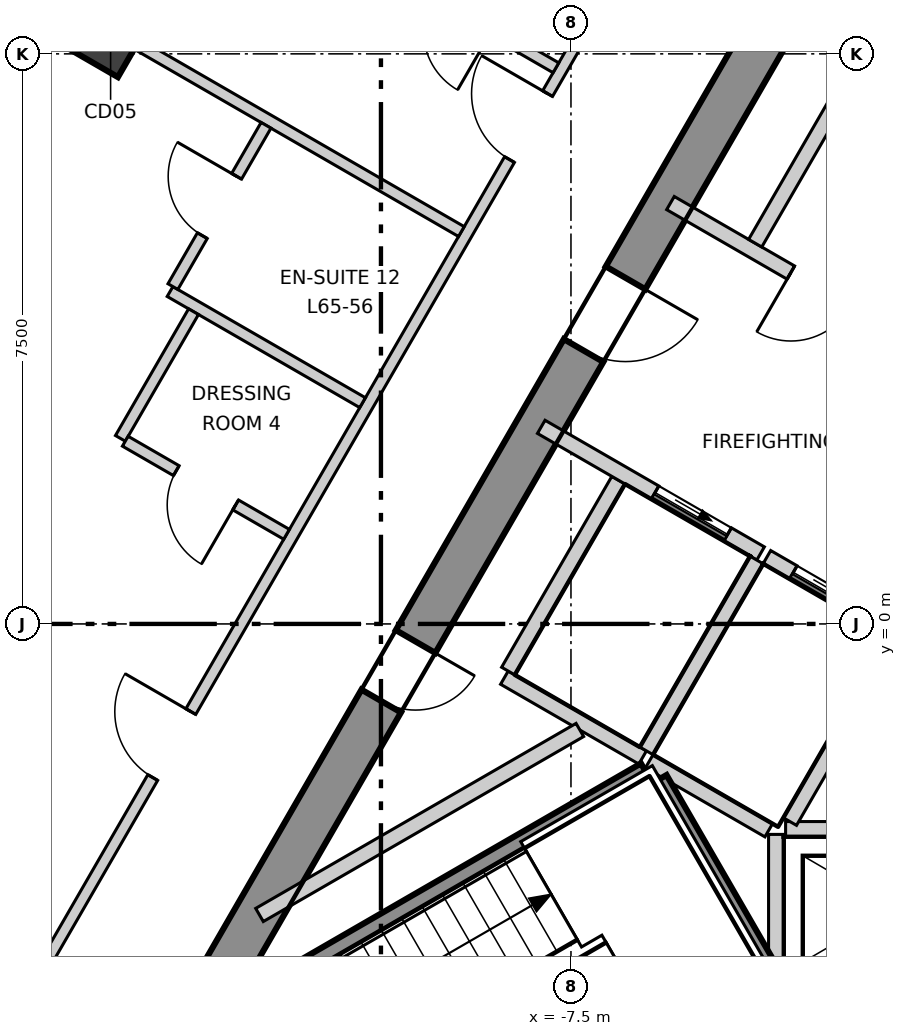
"""IFC4 building model, lengths in metres.
Left out: names, types, materials, properties, quantities, classifications, styles, units other than length and angle.
Written with IfcOpenShell. Run it as: python <this file> out.ifc"""

import sys

from ifc_helpers import new_model, si_unit, direction, frame, frame_2d, origin, origin_2d, place, context, subcontext, project, spatial, polyline, rectangle, outline, extrude, element, fill, save


model = new_model("IFC4")
c1 = context("Model", 3, precision=1e-05, world=origin(), true_north=direction((0.0, 1.0)))
c2 = subcontext(c1, "Body", "Model", "MODEL_VIEW")
j1 = project(units=[si_unit("LENGTHUNIT", "METRE"), si_unit("PLANEANGLEUNIT", "RADIAN")], contexts=[c1])
p1 = place(None, origin())
s1 = spatial("IfcSite", under=j1, at=p1, CompositionType="ELEMENT")
p2 = place(p1, origin())
s2 = spatial("IfcBuilding", under=s1, at=p2, CompositionType="ELEMENT")
p3 = place(p2, frame((0.0, 0.0, 279.1)))
s3 = spatial("IfcBuildingStorey", under=s2, at=p3, CompositionType="ELEMENT", Elevation=279.1)
p4 = place(p3, frame((-1.732, 13.3, -0.3), z_axis=(0.0, 0.0, 1.0), x_axis=(-0.500000539815, -0.866025092122, 0.0)))
e1 = element("IfcWall", 1, at=p4, inside=s3, PredefinedType="SHEAR", context=c2, shape_type="SweptSolid", body=[
    extrude(outline(polyline([(-0.173, -0.3), (1.795, -0.3), (3.763, -0.3), (5.732, -0.3), (7.7, -0.3), (9.668, -0.301), (11.637, -0.301), (13.605, -0.301), (15.573, -0.301), (17.542, -0.301), (19.51, -0.301), (21.478, -0.301), (21.131, 0.3), (19.226, 0.3), (17.321, 0.3), (15.415, 0.3), (13.51, 0.3), (11.605, 0.3), (9.699, 0.3), (7.794, 0.3), (5.889, 0.3), (3.984, 0.3), (2.078, 0.3), (0.173, 0.3), (-0.173, -0.3)])), origin(), (0.0, 0.0, 1.0), 3.6),
])
p5 = place(p4, frame((10.102, 0.0, 0.3)))
e2 = element("IfcOpeningElement", 2, at=p5, cuts=e1, PredefinedType="OPENING", context=c2, shape_type="SweptSolid", body=[
    extrude(rectangle(XDim=1.1, YDim=2.1, at=frame_2d((0.55, 1.05))), frame((0.0, 0.31, 0.0), z_axis=(0.0, -1.0, 0.0), x_axis=(1.0, 0.0, 0.0)), (0.0, 0.0, 1.0), 0.621),
])
p6 = place(p4, frame((15.627, 0.0, 0.3)))
e3 = element("IfcOpeningElement", 3, at=p6, cuts=e1, PredefinedType="OPENING", context=c2, shape_type="SweptSolid", body=[
    extrude(rectangle(XDim=0.9, YDim=2.1, at=frame_2d((0.45, 1.05))), frame((0.0, 0.31, 0.0), z_axis=(0.0, -1.0, 0.0), x_axis=(1.0, 0.0, 0.0)), (0.0, 0.0, 1.0), 0.621),
])
p7 = place(p3, frame((-13.557, 7.827, -0.3), z_axis=(0.0, 0.0, 1.0), x_axis=(0.5, 0.866025403784, 0.0)))
e4 = element("IfcColumn", 4, at=p7, inside=s3, PredefinedType="COLUMN", context=c2, shape_type="SweptSolid", body=[
    extrude(rectangle(XDim=1.0, YDim=0.8, at=origin_2d()), origin(), (0.0, 0.0, 1.0), 3.6),
])
p8 = place(p3, frame((-2.536, 28.316, 0.0), z_axis=(0.0, 0.0, 1.0), x_axis=(-0.500006870765, -0.86602143691, 0.0)))
e5 = element("IfcWall", 5, at=p8, inside=s3, PredefinedType="ELEMENTEDWALL", context=c2, shape_type="SweptSolid", body=[
    extrude(rectangle(XDim=46.49, YDim=0.2, at=frame_2d((23.245, 0.0))), origin(), (0.0, 0.0, 1.0), 3.3),
])
p9 = place(p8, frame((2.196, 0.0, 0.9)))
e6 = element("IfcOpeningElement", 6, at=p9, cuts=e5, PredefinedType="OPENING", context=c2, shape_type="SweptSolid", body=[
    extrude(rectangle(XDim=3.7, YDim=2.2, at=frame_2d((1.85, 1.1))), frame((0.0, 0.11, 0.0), z_axis=(0.0, -1.0, 0.0), x_axis=(1.0, 0.0, 0.0)), (0.0, 0.0, 1.0), 0.22),
])
p10 = place(p8, frame((7.684, 0.0, 0.9)))
e7 = element("IfcOpeningElement", 7, at=p10, cuts=e5, PredefinedType="OPENING", context=c2, shape_type="SweptSolid", body=[
    extrude(rectangle(XDim=3.7, YDim=2.2, at=frame_2d((1.85, 1.1))), frame((0.0, 0.11, 0.0), z_axis=(0.0, -1.0, 0.0), x_axis=(1.0, 0.0, 0.0)), (0.0, 0.0, 1.0), 0.22),
])
p11 = place(p8, frame((13.172, 0.0, 0.9)))
e8 = element("IfcOpeningElement", 8, at=p11, cuts=e5, PredefinedType="OPENING", context=c2, shape_type="SweptSolid", body=[
    extrude(rectangle(XDim=3.7, YDim=2.2, at=frame_2d((1.85, 1.1))), frame((0.0, 0.11, 0.0), z_axis=(0.0, -1.0, 0.0), x_axis=(1.0, 0.0, 0.0)), (0.0, 0.0, 1.0), 0.22),
])
p12 = place(p8, frame((18.66, 0.0, 0.9)))
e9 = element("IfcOpeningElement", 9, at=p12, cuts=e5, PredefinedType="OPENING", context=c2, shape_type="SweptSolid", body=[
    extrude(rectangle(XDim=3.7, YDim=2.2, at=frame_2d((1.85, 1.1))), frame((0.0, 0.11, 0.0), z_axis=(0.0, -1.0, 0.0), x_axis=(1.0, 0.0, 0.0)), (0.0, 0.0, 1.0), 0.22),
])
p13 = place(p8, frame((24.148, 0.0, 0.9)))
e10 = element("IfcOpeningElement", 10, at=p13, cuts=e5, PredefinedType="OPENING", context=c2, shape_type="SweptSolid", body=[
    extrude(rectangle(XDim=3.7, YDim=2.2, at=frame_2d((1.85, 1.1))), frame((0.0, 0.11, 0.0), z_axis=(0.0, -1.0, 0.0), x_axis=(1.0, 0.0, 0.0)), (0.0, 0.0, 1.0), 0.22),
])
p14 = place(p8, frame((29.636, 0.0, 0.9)))
e11 = element("IfcOpeningElement", 11, at=p14, cuts=e5, PredefinedType="OPENING", context=c2, shape_type="SweptSolid", body=[
    extrude(rectangle(XDim=3.7, YDim=2.2, at=frame_2d((1.85, 1.1))), frame((0.0, 0.11, 0.0), z_axis=(0.0, -1.0, 0.0), x_axis=(1.0, 0.0, 0.0)), (0.0, 0.0, 1.0), 0.22),
])
p15 = place(p8, frame((35.124, 0.0, 0.9)))
e12 = element("IfcOpeningElement", 12, at=p15, cuts=e5, PredefinedType="OPENING", context=c2, shape_type="SweptSolid", body=[
    extrude(rectangle(XDim=3.7, YDim=2.2, at=frame_2d((1.85, 1.1))), frame((0.0, 0.11, 0.0), z_axis=(0.0, -1.0, 0.0), x_axis=(1.0, 0.0, 0.0)), (0.0, 0.0, 1.0), 0.22),
])
p16 = place(p8, frame((40.612, 0.0, 0.9)))
e13 = element("IfcOpeningElement", 13, at=p16, cuts=e5, PredefinedType="OPENING", context=c2, shape_type="SweptSolid", body=[
    extrude(rectangle(XDim=3.7, YDim=2.2, at=frame_2d((1.85, 1.1))), frame((0.0, 0.11, 0.0), z_axis=(0.0, -1.0, 0.0), x_axis=(1.0, 0.0, 0.0)), (0.0, 0.0, 1.0), 0.22),
])
p17 = place(p3, frame((-17.678, -10.119, 0.0), z_axis=(0.0, 0.0, 1.0), x_axis=(0.500003190174, 0.866023561929, 0.0)))
e14 = element("IfcWall", 14, at=p17, inside=s3, PredefinedType="PARTITIONING", context=c2, shape_type="SweptSolid", body=[
    extrude(rectangle(XDim=35.356, YDim=0.15, at=frame_2d((17.678, 0.0))), origin(), (0.0, 0.0, 1.0), 3.3),
])
p18 = place(p17, frame((28.706, 0.0, 0.0)))
e15 = element("IfcOpeningElement", 15, at=p18, cuts=e14, PredefinedType="OPENING", context=c2, shape_type="SweptSolid", body=[
    extrude(rectangle(XDim=1.0, YDim=2.1, at=frame_2d((0.5, 1.05))), frame((0.0, 0.085, 0.0), z_axis=(0.0, -1.0, 0.0), x_axis=(1.0, 0.0, 0.0)), (0.0, 0.0, 1.0), 0.17),
])
p19 = place(p17, frame((18.74, 0.0, 0.0)))
e16 = element("IfcOpeningElement", 16, at=p19, cuts=e14, PredefinedType="OPENING", context=c2, shape_type="SweptSolid", body=[
    extrude(rectangle(XDim=1.0, YDim=2.1, at=frame_2d((0.5, 1.05))), frame((0.0, 0.085, 0.0), z_axis=(0.0, -1.0, 0.0), x_axis=(1.0, 0.0, 0.0)), (0.0, 0.0, 1.0), 0.17),
])
p20 = place(p17, frame((9.352, 0.0, 0.0)))
e17 = element("IfcOpeningElement", 17, at=p20, cuts=e14, PredefinedType="OPENING", context=c2, shape_type="SweptSolid", body=[
    extrude(rectangle(XDim=1.0, YDim=2.1, at=frame_2d((0.5, 1.05))), frame((0.0, 0.085, 0.0), z_axis=(0.0, -1.0, 0.0), x_axis=(1.0, 0.0, 0.0)), (0.0, 0.0, 1.0), 0.17),
])
p21 = place(p17, frame((2.777, 0.0, 0.0)))
e18 = element("IfcOpeningElement", 18, at=p21, cuts=e14, PredefinedType="OPENING", context=c2, shape_type="SweptSolid", body=[
    extrude(rectangle(XDim=1.0, YDim=2.1, at=frame_2d((0.5, 1.05))), frame((0.0, 0.085, 0.0), z_axis=(0.0, -1.0, 0.0), x_axis=(1.0, 0.0, 0.0)), (0.0, 0.0, 1.0), 0.17),
])
p22 = place(p3, frame((-14.094, 8.137, 0.0), z_axis=(0.0, 0.0, 1.0), x_axis=(0.866004483474, -0.50003623329, 0.0)))
e19 = element("IfcWall", 19, at=p22, inside=s3, PredefinedType="PARTITIONING", context=c2, shape_type="SweptSolid", body=[
    extrude(rectangle(XDim=5.949, YDim=0.15, at=frame_2d((2.975, 0.0))), origin(), (0.0, 0.0, 1.0), 2.8),
])
p23 = place(p3, frame((-12.775, 4.373, 0.0), z_axis=(0.0, 0.0, 1.0), x_axis=(0.866061874444, -0.499936825643, 0.0)))
e20 = element("IfcWall", 20, at=p23, inside=s3, PredefinedType="PARTITIONING", context=c2, shape_type="SweptSolid", body=[
    extrude(rectangle(XDim=2.925, YDim=0.15, at=frame_2d((1.462, 0.0))), origin(), (0.0, 0.0, 1.0), 3.3),
])
p24 = place(p3, frame((-12.737, 4.438, 0.0), z_axis=(0.0, 0.0, 1.0), x_axis=(0.499975448907, 0.8660395779, 0.0)))
e21 = element("IfcWall", 21, at=p24, inside=s3, PredefinedType="PARTITIONING", context=c2, shape_type="SweptSolid", body=[
    extrude(rectangle(XDim=2.45, YDim=0.15, at=frame_2d((1.225, 0.0))), origin(), (0.0, 0.0, 1.0), 3.3),
])
p25 = place(p24, frame((0.775, 0.0, 0.0)))
e22 = element("IfcOpeningElement", 22, at=p25, cuts=e21, PredefinedType="OPENING", context=c2, shape_type="SweptSolid", body=[
    extrude(rectangle(XDim=0.9, YDim=2.1, at=frame_2d((0.45, 1.05))), frame((0.0, 0.085, 0.0), z_axis=(0.0, -1.0, 0.0), x_axis=(1.0, 0.0, 0.0)), (0.0, 0.0, 1.0), 0.17),
])
p26 = place(p3, frame((-13.428, 2.441, 0.0), z_axis=(0.0, 0.0, 1.0), x_axis=(0.499795662447, 0.866143345988, 0.0)))
e23 = element("IfcWall", 23, at=p26, inside=s3, PredefinedType="PARTITIONING", context=c2, shape_type="SweptSolid", body=[
    extrude(rectangle(XDim=1.925, YDim=0.15, at=frame_2d((0.962, 0.0))), origin(), (0.0, 0.0, 1.0), 3.3),
])
p27 = place(p3, frame((-13.364, 2.404, 0.0), z_axis=(0.0, 0.0, 1.0), x_axis=(0.8660395779, -0.499975448907, 0.0)))
e24 = element("IfcWall", 24, at=p27, inside=s3, PredefinedType="PARTITIONING", context=c2, shape_type="SweptSolid", body=[
    extrude(rectangle(XDim=2.45, YDim=0.15, at=frame_2d((1.225, 0.0))), origin(), (0.0, 0.0, 1.0), 3.3),
])
p28 = place(p27, frame((0.776, 0.0, 0.0)))
e25 = element("IfcOpeningElement", 25, at=p28, cuts=e24, PredefinedType="OPENING", context=c2, shape_type="SweptSolid", body=[
    extrude(rectangle(XDim=0.9, YDim=2.1, at=frame_2d((0.45, 1.05))), frame((0.0, 0.085, 0.0), z_axis=(0.0, -1.0, 0.0), x_axis=(1.0, 0.0, 0.0)), (0.0, 0.0, 1.0), 0.17),
])
p29 = place(p3, frame((-10.166, 8.742, 0.0), z_axis=(0.0, 0.0, 1.0), x_axis=(0.866004402611, -0.500036373335, 0.0)))
e26 = element("IfcWall", 26, at=p29, inside=s3, PredefinedType="PARTITIONING", context=c2, shape_type="SweptSolid", body=[
    extrude(rectangle(XDim=2.85, YDim=0.15, at=frame_2d((1.425, 0.0))), origin(), (0.0, 0.0, 1.0), 3.3),
])
p30 = place(p29, frame((0.975, 0.0, 0.0)))
e27 = element("IfcOpeningElement", 27, at=p30, cuts=e26, PredefinedType="OPENING", context=c2, shape_type="SweptSolid", body=[
    extrude(rectangle(XDim=0.9, YDim=2.1, at=frame_2d((0.45, 1.05))), frame((0.0, 0.085, 0.0), z_axis=(0.0, -1.0, 0.0), x_axis=(1.0, 0.0, 0.0)), (0.0, 0.0, 1.0), 0.17),
])
p31 = place(p3, frame((-8.376, -0.707, 0.0), z_axis=(0.0, 0.0, 1.0), x_axis=(0.866067520717, -0.499927044236, 0.0)))
e28 = element("IfcWall", 28, at=p31, inside=s3, PredefinedType="SOLIDWALL", context=c2, shape_type="SweptSolid", body=[
    extrude(rectangle(XDim=2.1, YDim=0.2, at=frame_2d((1.05, 0.0))), origin(), (0.0, 0.0, 1.0), 3.3),
])
p32 = place(p3, frame((-8.326, -0.62, 0.0), z_axis=(0.0, 0.0, 1.0), x_axis=(0.500023687443, 0.866011727401, 0.0)))
e29 = element("IfcWall", 29, at=p32, inside=s3, PredefinedType="SOLIDWALL", context=c2, shape_type="SweptSolid", body=[
    extrude(rectangle(XDim=2.9, YDim=0.2, at=frame_2d((1.45, 0.0))), origin(), (0.0, 0.0, 1.0), 3.3),
])
p33 = place(p3, frame((-4.8, -6.9, 0.0), z_axis=(0.0, 0.0, 1.0), x_axis=(0.0, 1.0, 0.0)))
e30 = element("IfcWall", 30, at=p33, inside=s3, PredefinedType="SOLIDWALL", context=c2, shape_type="SweptSolid", body=[
    extrude(rectangle(XDim=4.131, YDim=0.2, at=frame_2d((2.065, 0.0))), origin(), (0.0, 0.0, 1.0), 3.3),
])
p34 = place(p3, frame((-4.676, -2.7, 0.0), z_axis=(0.0, 0.0, 1.0), x_axis=(1.0, 0.0, 0.0)))
e31 = element("IfcWall", 31, at=p34, inside=s3, PredefinedType="SOLIDWALL", context=c2, shape_type="SweptSolid", body=[
    extrude(rectangle(XDim=2.873, YDim=0.2, at=frame_2d((1.437, 0.0))), origin(), (0.0, 0.0, 1.0), 3.3),
])
p35 = place(p34, frame((0.937, 0.0, 0.0)))
e32 = element("IfcOpeningElement", 32, at=p35, cuts=e31, PredefinedType="OPENING", context=c2, shape_type="SweptSolid", body=[
    extrude(rectangle(XDim=1.1, YDim=2.1, at=frame_2d((0.55, 1.05))), frame((0.0, 0.11, 0.0), z_axis=(0.0, -1.0, 0.0), x_axis=(1.0, 0.0, 0.0)), (0.0, 0.0, 1.0), 0.22),
])
p36 = place(p3, frame((-7.891, 2.593, 0.0), z_axis=(0.0, 0.0, 1.0), x_axis=(0.866070917804, -0.499921159118, 0.0)))
e33 = element("IfcWall", 33, at=p36, inside=s3, PredefinedType="SOLIDWALL", context=c2, shape_type="SweptSolid", body=[
    extrude(rectangle(XDim=3.333, YDim=0.2, at=frame_2d((1.666, 0.0))), origin(), (0.0, 0.0, 1.0), 3.3),
])
p37 = place(p36, frame((1.73, 0.0, 0.0)))
e34 = element("IfcOpeningElement", 34, at=p37, cuts=e33, PredefinedType="OPENING", context=c2, shape_type="SweptSolid", body=[
    extrude(rectangle(XDim=1.1, YDim=2.1, at=frame_2d((0.55, 1.05))), frame((0.0, 0.11, 0.0), z_axis=(0.0, -1.0, 0.0), x_axis=(1.0, 0.0, 0.0)), (0.0, 0.0, 1.0), 0.22),
])
p38 = place(p3, frame((-6.191, 5.537, 0.0), z_axis=(0.0, 0.0, 1.0), x_axis=(0.866052607023, -0.499952879648, 0.0)))
e35 = element("IfcWall", 35, at=p38, inside=s3, PredefinedType="SOLIDWALL", context=c2, shape_type="SweptSolid", body=[
    extrude(rectangle(XDim=3.332, YDim=0.2, at=frame_2d((1.666, 0.0))), origin(), (0.0, 0.0, 1.0), 3.3),
])
p39 = place(p38, frame((1.83, 0.0, 0.0)))
e36 = element("IfcOpeningElement", 36, at=p39, cuts=e35, PredefinedType="OPENING", context=c2, shape_type="SweptSolid", body=[
    extrude(rectangle(XDim=0.9, YDim=2.1, at=frame_2d((0.45, 1.05))), frame((0.0, 0.11, 0.0), z_axis=(0.0, -1.0, 0.0), x_axis=(1.0, 0.0, 0.0)), (0.0, 0.0, 1.0), 0.22),
])
p40 = place(p3, frame((-5.076, 5.009, 0.0), z_axis=(0.0, 0.0, 1.0), x_axis=(0.50002537861, 0.866010750942, 0.0)))
e37 = element("IfcWall", 37, at=p40, inside=s3, PredefinedType="SOLIDWALL", context=c2, shape_type="SweptSolid", body=[
    extrude(rectangle(XDim=3.0, YDim=0.2, at=frame_2d((1.5, 0.0))), origin(), (0.0, 0.0, 1.0), 3.3),
])
p41 = place(p3, frame((-6.507, -1.67, 0.0), z_axis=(0.0, 0.0, 1.0), x_axis=(0.50012328804, 0.865954211699, 0.0)))
e38 = element("IfcWall", 38, at=p41, inside=s3, PredefinedType="SOLIDWALL", context=c2, shape_type="SweptSolid", body=[
    extrude(rectangle(XDim=2.9, YDim=0.2, at=frame_2d((1.45, 0.0))), origin(), (0.0, 0.0, 1.0), 3.3),
])
p42 = place(p3, frame((-6.47, -1.807, 0.0), z_axis=(0.0, 0.0, 1.0), x_axis=(0.865883195159, -0.500246231712, 0.0)))
e39 = element("IfcWall", 39, at=p42, inside=s3, PredefinedType="SOLIDWALL", context=c2, shape_type="SweptSolid", body=[
    extrude(rectangle(XDim=1.815, YDim=0.2, at=frame_2d((0.908, 0.0))), origin(), (0.0, 0.0, 1.0), 3.3),
])
p43 = place(p3, frame((-4.922, 0.879, 0.0), z_axis=(0.0, 0.0, 1.0), x_axis=(0.866073918653, -0.499915960366, 0.0)))
e40 = element("IfcWall", 40, at=p43, inside=s3, PredefinedType="SOLIDWALL", context=c2, shape_type="SweptSolid", body=[
    extrude(rectangle(XDim=2.002, YDim=0.2, at=frame_2d((1.001, 0.0))), origin(), (0.0, 0.0, 1.0), 3.3),
])
p44 = place(p43, frame((0.402, 0.0, 0.0)))
e41 = element("IfcOpeningElement", 41, at=p44, cuts=e40, PredefinedType="OPENING", context=c2, shape_type="SweptSolid", body=[
    extrude(rectangle(XDim=1.1, YDim=2.1, at=frame_2d((0.55, 1.05))), frame((0.0, 0.11, 0.0), z_axis=(0.0, -1.0, 0.0), x_axis=(1.0, 0.0, 0.0)), (0.0, 0.0, 1.0), 0.22),
])
p45 = place(p3, frame((-4.619, -2.6, 0.0), z_axis=(0.0, 0.0, 1.0), x_axis=(0.50009492287, 0.865970593103, 0.0)))
e42 = element("IfcWall", 42, at=p45, inside=s3, PredefinedType="SOLIDWALL", context=c2, shape_type="SweptSolid", body=[
    extrude(rectangle(XDim=2.761, YDim=0.2, at=frame_2d((1.381, 0.0))), origin(), (0.0, 0.0, 1.0), 3.3),
])
p46 = place(p3, frame((-11.598, -3.829, 0.0), z_axis=(0.0, 0.0, 1.0), x_axis=(0.865968383994, 0.500098748171, 0.0)))
e43 = element("IfcWall", 43, at=p46, inside=s3, PredefinedType="SOLIDWALL", context=c2, shape_type="SweptSolid", body=[
    extrude(rectangle(XDim=4.867, YDim=0.2, at=frame_2d((2.434, 0.0))), origin(), (0.0, 0.0, 1.0), 3.3),
])
p47 = place(p3, frame((-12.301, -5.254, 0.0), z_axis=(0.0, 0.0, 1.0), x_axis=(0.866068467981, 0.499925403204, 0.0)))
e44 = element("IfcWall", 44, at=p47, inside=s3, PredefinedType="SOLIDWALL", context=c2, shape_type="SweptSolid", body=[
    extrude(rectangle(XDim=6.665, YDim=0.2, at=frame_2d((3.332, 0.0))), origin(), (0.0, 0.0, 1.0), 3.3),
])
p48 = place(p3, frame((-6.329, -2.038, 0.0), z_axis=(0.0, 0.0, 1.0), x_axis=(0.500200581029, -0.865909567298, 0.0)))
e45 = element("IfcWall", 45, at=p48, inside=s3, PredefinedType="SOLIDWALL", context=c2, shape_type="SweptSolid", body=[
    extrude(rectangle(XDim=2.799, YDim=0.2, at=frame_2d((1.399, 0.0))), origin(), (0.0, 0.0, 1.0), 3.3),
])
p49 = place(p44, origin())
e46 = element("IfcDoor", 46, at=p49, inside=s3, OperationType="SLIDING_TO_LEFT", PredefinedType="DOOR", context=c2, shape_type="SweptSolid", body=[
    extrude(rectangle(XDim=1.1, YDim=2.1, at=frame_2d((0.55, 1.05))), frame((0.0, 0.025, 0.0), z_axis=(0.0, -1.0, 0.0), x_axis=(1.0, 0.0, 0.0)), (0.0, 0.0, 1.0), 0.05),
])
fill(e41, e46)
p50 = place(p37, origin())
e47 = element("IfcDoor", 47, at=p50, inside=s3, OperationType="SLIDING_TO_LEFT", PredefinedType="DOOR", context=c2, shape_type="SweptSolid", body=[
    extrude(rectangle(XDim=1.1, YDim=2.1, at=frame_2d((0.55, 1.05))), frame((0.0, 0.025, 0.0), z_axis=(0.0, -1.0, 0.0), x_axis=(1.0, 0.0, 0.0)), (0.0, 0.0, 1.0), 0.05),
])
fill(e34, e47)
p51 = place(p39, origin())
e48 = element("IfcDoor", 48, at=p51, inside=s3, OperationType="SINGLE_SWING_LEFT", PredefinedType="DOOR", context=c2, shape_type="SweptSolid", body=[
    extrude(rectangle(XDim=0.9, YDim=2.1, at=frame_2d((0.45, 1.05))), frame((0.0, 0.025, 0.0), z_axis=(0.0, -1.0, 0.0), x_axis=(1.0, 0.0, 0.0)), (0.0, 0.0, 1.0), 0.05),
])
fill(e36, e48)
p52 = place(p19, origin())
e49 = element("IfcDoor", 49, at=p52, inside=s3, OperationType="SINGLE_SWING_LEFT", PredefinedType="DOOR", context=c2, shape_type="SweptSolid", body=[
    extrude(rectangle(XDim=1.0, YDim=2.1, at=frame_2d((0.5, 1.05))), frame((0.0, 0.025, 0.0), z_axis=(0.0, -1.0, 0.0), x_axis=(1.0, 0.0, 0.0)), (0.0, 0.0, 1.0), 0.05),
])
fill(e16, e49)
p53 = place(p20, origin())
e50 = element("IfcDoor", 50, at=p53, inside=s3, OperationType="SINGLE_SWING_LEFT", PredefinedType="DOOR", context=c2, shape_type="SweptSolid", body=[
    extrude(rectangle(XDim=1.0, YDim=2.1, at=frame_2d((0.5, 1.05))), frame((0.0, 0.025, 0.0), z_axis=(0.0, -1.0, 0.0), x_axis=(1.0, 0.0, 0.0)), (0.0, 0.0, 1.0), 0.05),
])
fill(e17, e50)
p54 = place(p25, origin())
e51 = element("IfcDoor", 51, at=p54, inside=s3, OperationType="SINGLE_SWING_LEFT", PredefinedType="DOOR", context=c2, shape_type="SweptSolid", body=[
    extrude(rectangle(XDim=0.9, YDim=2.1, at=frame_2d((0.45, 1.05))), frame((0.0, 0.025, 0.0), z_axis=(0.0, -1.0, 0.0), x_axis=(1.0, 0.0, 0.0)), (0.0, 0.0, 1.0), 0.05),
])
fill(e22, e51)
p55 = place(p28, origin())
e52 = element("IfcDoor", 52, at=p55, inside=s3, OperationType="SINGLE_SWING_RIGHT", PredefinedType="DOOR", context=c2, shape_type="SweptSolid", body=[
    extrude(rectangle(XDim=0.9, YDim=2.1, at=frame_2d((0.45, 1.05))), frame((0.0, 0.025, 0.0), z_axis=(0.0, -1.0, 0.0), x_axis=(1.0, 0.0, 0.0)), (0.0, 0.0, 1.0), 0.05),
])
fill(e25, e52)
p56 = place(p5, origin())
e53 = element("IfcDoor", 53, at=p56, inside=s3, OperationType="SINGLE_SWING_RIGHT", PredefinedType="DOOR", context=c2, shape_type="SweptSolid", body=[
    extrude(rectangle(XDim=1.1, YDim=2.1, at=frame_2d((0.55, 1.05))), frame((0.0, 0.025, 0.0), z_axis=(0.0, -1.0, 0.0), x_axis=(1.0, 0.0, 0.0)), (0.0, 0.0, 1.0), 0.05),
])
fill(e2, e53)
p57 = place(p6, origin())
e54 = element("IfcDoor", 54, at=p57, inside=s3, OperationType="SINGLE_SWING_RIGHT", PredefinedType="DOOR", context=c2, shape_type="SweptSolid", body=[
    extrude(rectangle(XDim=0.9, YDim=2.1, at=frame_2d((0.45, 1.05))), frame((0.0, 0.025, 0.0), z_axis=(0.0, -1.0, 0.0), x_axis=(1.0, 0.0, 0.0)), (0.0, 0.0, 1.0), 0.05),
])
fill(e3, e54)
save(model, sys.argv[1])
